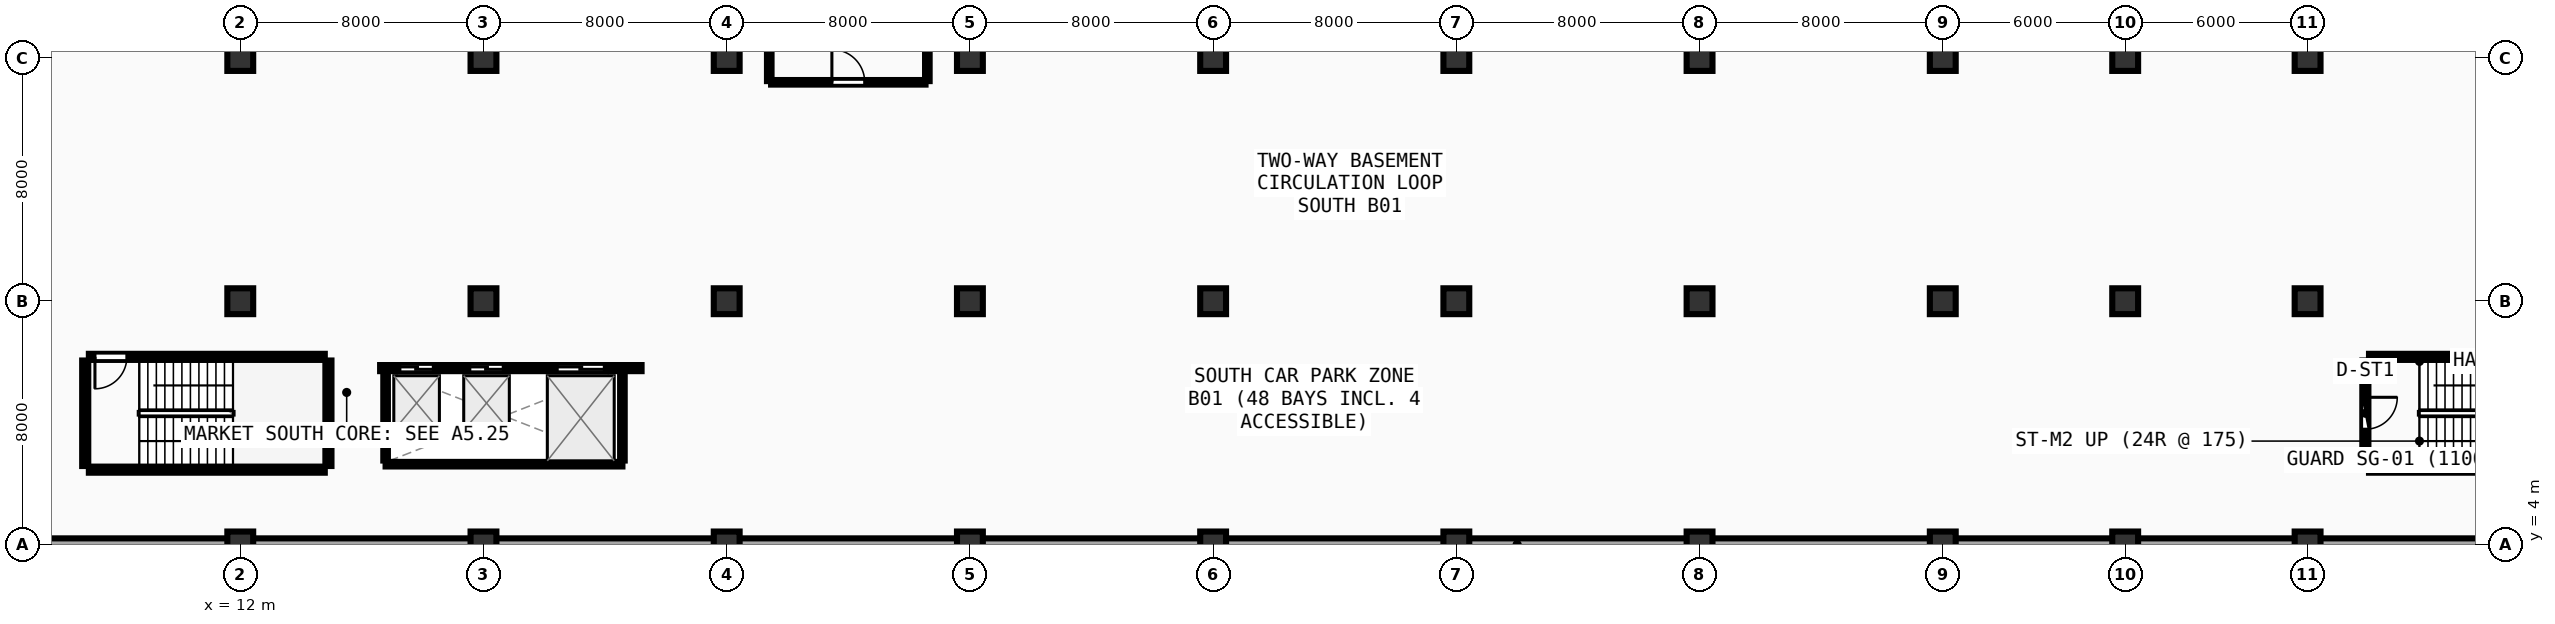
"""IFC4 building model, lengths in metres.
Left out: names, types, materials, properties, quantities, classifications, styles, units other than length and angle.
Written with IfcOpenShell. Run it as: python <this file> out.ifc"""

import sys

from ifc_helpers import new_model, si_unit, direction, frame, frame_2d, origin, origin_2d, place, context, subcontext, project, spatial, rectangle, extrude, element, fill, save


model = new_model("IFC4")
c1 = context("Model", 3, precision=1e-05, world=origin(), true_north=direction((0.0, 1.0)))
c2 = subcontext(c1, "Body", "Model", "MODEL_VIEW")
j1 = project(units=[si_unit("LENGTHUNIT", "METRE"), si_unit("PLANEANGLEUNIT", "RADIAN")], contexts=[c1])
p1 = place(None, origin())
s1 = spatial("IfcSite", under=j1, at=p1, CompositionType="ELEMENT")
p2 = place(p1, origin())
s2 = spatial("IfcBuilding", under=s1, at=p2, CompositionType="ELEMENT")
p3 = place(p2, frame((0.0, 0.0, -4.2)))
s3 = spatial("IfcBuildingStorey", under=s2, at=p3, CompositionType="ELEMENT", Elevation=-4.2)
for number, where, z_axis, x_axis in (
    (1, (12.0, 4.0, 0.0), (0.0, 0.0, 1.0), (1.0, 0.0, 0.0)),
    (2, (12.0, 12.0, 0.0), (0.0, 0.0, 1.0), (1.0, 0.0, 0.0)),
    (3, (12.0, 20.0, 0.0), (0.0, 0.0, 1.0), (1.0, 0.0, 0.0)),
    (4, (20.0, 4.0, 0.0), (0.0, 0.0, 1.0), (1.0, 0.0, 0.0)),
    (5, (20.0, 12.0, 0.0), (0.0, 0.0, 1.0), (1.0, 0.0, 0.0)),
    (6, (20.0, 20.0, 0.0), (0.0, 0.0, 1.0), (1.0, 0.0, 0.0)),
    (7, (28.0, 4.0, 0.0), (0.0, 0.0, 1.0), (1.0, 0.0, 0.0)),
    (8, (28.0, 12.0, 0.0), (0.0, 0.0, 1.0), (1.0, 0.0, 0.0)),
    (9, (28.0, 20.0, 0.0), (0.0, 0.0, 1.0), (1.0, 0.0, 0.0)),
    (10, (36.0, 4.0, 0.0), (0.0, 0.0, 1.0), (1.0, 0.0, 0.0)),
    (11, (36.0, 12.0, 0.0), (0.0, 0.0, 1.0), (1.0, 0.0, 0.0)),
    (12, (36.0, 20.0, 0.0), (0.0, 0.0, 1.0), (1.0, 0.0, 0.0)),
    (13, (44.0, 4.0, 0.0), (0.0, 0.0, 1.0), (1.0, 0.0, 0.0)),
    (14, (44.0, 12.0, 0.0), (0.0, 0.0, 1.0), (1.0, 0.0, 0.0)),
    (15, (44.0, 20.0, 0.0), (0.0, 0.0, 1.0), (1.0, 0.0, 0.0)),
    (16, (52.0, 4.0, 0.0), (0.0, 0.0, 1.0), (1.0, 0.0, 0.0)),
    (17, (52.0, 12.0, 0.0), (0.0, 0.0, 1.0), (1.0, 0.0, 0.0)),
    (18, (52.0, 20.0, 0.0), (0.0, 0.0, 1.0), (1.0, 0.0, 0.0)),
    (19, (60.0, 4.0, 0.0), (0.0, 0.0, 1.0), (1.0, 0.0, 0.0)),
    (20, (60.0, 12.0, 0.0), (0.0, 0.0, 1.0), (1.0, 0.0, 0.0)),
    (21, (60.0, 20.0, 0.0), (0.0, 0.0, 1.0), (1.0, 0.0, 0.0)),
    (22, (68.0, 4.0, 0.0), (0.0, 0.0, 1.0), (1.0, 0.0, 0.0)),
    (23, (68.0, 12.0, 0.0), (0.0, 0.0, 1.0), (1.0, 0.0, 0.0)),
    (24, (68.0, 20.0, 0.0), (0.0, 0.0, 1.0), (1.0, 0.0, 0.0)),
    (25, (74.0, 4.0, 0.0), (0.0, 0.0, 1.0), (1.0, 0.0, 0.0)),
    (26, (74.0, 12.0, 0.0), (0.0, 0.0, 1.0), (1.0, 0.0, 0.0)),
    (27, (74.0, 20.0, 0.0), (0.0, 0.0, 1.0), (1.0, 0.0, 0.0)),
    (28, (80.0, 4.0, 0.0), (0.0, 0.0, 1.0), (1.0, 0.0, 0.0)),
    (29, (80.0, 12.0, 0.0), (0.0, 0.0, 1.0), (1.0, 0.0, 0.0)),
    (30, (80.0, 20.0, 0.0), (0.0, 0.0, 1.0), (1.0, 0.0, 0.0)),
):
    element("IfcColumn", number, at=place(p3, frame(where, z_axis=z_axis, x_axis=x_axis)), inside=s3, PredefinedType="COLUMN", context=c2, shape_type="SweptSolid", body=[
        extrude(rectangle(XDim=0.85, YDim=0.85, at=origin_2d()), origin(), (0.0, 0.0, 1.0), 4.2),
    ])
p4 = place(p3, frame((4.55, 4.0, 0.0), z_axis=(0.0, 0.0, 1.0), x_axis=(1.0, 0.0, 0.0)))
e31 = element("IfcWall", 31, at=p4, inside=s3, PredefinedType="USERDEFINED", context=c2, shape_type="SweptSolid", body=[
    extrude(rectangle(XDim=98.9, YDim=0.4, at=frame_2d((49.45, 0.0))), origin(), (0.0, 0.0, 1.0), 3.9),
])
p5 = place(p3, frame((7.02, 6.46, 0.0), z_axis=(0.0, 0.0, 1.0), x_axis=(1.0, 0.0, 0.0)))
e32 = element("IfcWall", 32, at=p5, inside=s3, PredefinedType="SHEAR", context=c2, shape_type="SweptSolid", body=[
    extrude(rectangle(XDim=7.76, YDim=0.2, at=frame_2d((3.88, 0.0))), origin(), (0.0, 0.0, 1.0), 3.88),
])
p6 = place(p3, frame((14.9, 6.58, 0.0), z_axis=(0.0, 0.0, 1.0), x_axis=(0.0, 1.0, 0.0)))
e33 = element("IfcWall", 33, at=p6, inside=s3, PredefinedType="SHEAR", context=c2, shape_type="SweptSolid", body=[
    extrude(rectangle(XDim=3.47, YDim=0.2, at=frame_2d((1.735, 0.0))), origin(), (0.0, 0.0, 1.0), 3.88),
])
p7 = place(p3, frame((14.78, 10.17, 0.0), z_axis=(0.0, 0.0, 1.0), x_axis=(-1.0, 0.0, 0.0)))
e34 = element("IfcWall", 34, at=p7, inside=s3, PredefinedType="SHEAR", context=c2, shape_type="SweptSolid", body=[
    extrude(rectangle(XDim=7.76, YDim=0.2, at=frame_2d((3.88, 0.0))), origin(), (0.0, 0.0, 1.0), 3.88),
])
p8 = place(p7, frame((6.51, 0.0, 0.0)))
e35 = element("IfcOpeningElement", 35, at=p8, cuts=e34, PredefinedType="OPENING", context=c2, shape_type="SweptSolid", body=[
    extrude(rectangle(XDim=1.05, YDim=2.1, at=frame_2d((0.525, 1.05))), frame((0.0, 0.11, 0.0), z_axis=(0.0, -1.0, 0.0), x_axis=(1.0, 0.0, 0.0)), (0.0, 0.0, 1.0), 0.22),
])
p9 = place(p3, frame((6.9, 10.05, 0.0), z_axis=(0.0, 0.0, 1.0), x_axis=(0.0, -1.0, 0.0)))
e36 = element("IfcWall", 36, at=p9, inside=s3, PredefinedType="SHEAR", context=c2, shape_type="SweptSolid", body=[
    extrude(rectangle(XDim=3.47, YDim=0.2, at=frame_2d((1.735, 0.0))), origin(), (0.0, 0.0, 1.0), 3.88),
])
for number, where, z_axis, x_axis in (
    (37, (82.02, 6.46, 0.0), (0.0, 0.0, 1.0), (1.0, 0.0, 0.0)),
    (38, (89.78, 10.17, 0.0), (0.0, 0.0, 1.0), (-1.0, 0.0, 0.0)),
):
    element("IfcWall", number, at=place(p3, frame(where, z_axis=z_axis, x_axis=x_axis)), inside=s3, PredefinedType="SHEAR", context=c2, shape_type="SweptSolid", body=[
        extrude(rectangle(XDim=7.76, YDim=0.2, at=frame_2d((3.88, 0.0))), origin(), (0.0, 0.0, 1.0), 3.88),
    ])
p10 = place(p3, frame((81.9, 10.05, 0.0), z_axis=(0.0, 0.0, 1.0), x_axis=(0.0, -1.0, 0.0)))
e39 = element("IfcWall", 39, at=p10, inside=s3, PredefinedType="SHEAR", context=c2, shape_type="SweptSolid", body=[
    extrude(rectangle(XDim=3.47, YDim=0.2, at=frame_2d((1.735, 0.0))), origin(), (0.0, 0.0, 1.0), 3.88),
])
p11 = place(p10, frame((1.21, 0.0, 0.0)))
e40 = element("IfcOpeningElement", 40, at=p11, cuts=e39, PredefinedType="OPENING", context=c2, shape_type="SweptSolid", body=[
    extrude(rectangle(XDim=1.05, YDim=2.1, at=frame_2d((0.525, 1.05))), frame((0.0, 0.11, 0.0), z_axis=(0.0, -1.0, 0.0), x_axis=(1.0, 0.0, 0.0)), (0.0, 0.0, 1.0), 0.22),
])
p12 = place(p3, frame((16.6, 9.8, 0.0), z_axis=(0.0, 0.0, 1.0), x_axis=(1.0, 0.0, 0.0)))
e41 = element("IfcWall", 41, at=p12, inside=s3, PredefinedType="SOLIDWALL", context=c2, shape_type="SweptSolid", body=[
    extrude(rectangle(XDim=8.6, YDim=0.2, at=frame_2d((4.3, 0.0))), origin(), (0.0, 0.0, 1.0), 2.685),
])
p13 = place(p12, frame((0.65, 0.0, 0.0)))
e42 = element("IfcOpeningElement", 42, at=p13, cuts=e41, PredefinedType="OPENING", context=c2, shape_type="SweptSolid", body=[
    extrude(rectangle(XDim=1.1, YDim=2.1, at=frame_2d((0.55, 1.05))), frame((0.0, 0.11, 0.0), z_axis=(0.0, -1.0, 0.0), x_axis=(1.0, 0.0, 0.0)), (0.0, 0.0, 1.0), 0.22),
])
p14 = place(p12, frame((2.95, 0.0, 0.0)))
e43 = element("IfcOpeningElement", 43, at=p14, cuts=e41, PredefinedType="OPENING", context=c2, shape_type="SweptSolid", body=[
    extrude(rectangle(XDim=1.1, YDim=2.1, at=frame_2d((0.55, 1.05))), frame((0.0, 0.11, 0.0), z_axis=(0.0, -1.0, 0.0), x_axis=(1.0, 0.0, 0.0)), (0.0, 0.0, 1.0), 0.22),
])
p15 = place(p12, frame((5.825, 0.0, 0.0)))
e44 = element("IfcOpeningElement", 44, at=p15, cuts=e41, PredefinedType="OPENING", context=c2, shape_type="SweptSolid", body=[
    extrude(rectangle(XDim=1.55, YDim=2.2, at=frame_2d((0.775, 1.1))), frame((0.0, 0.11, 0.0), z_axis=(0.0, -1.0, 0.0), x_axis=(1.0, 0.0, 0.0)), (0.0, 0.0, 1.0), 0.22),
])
p16 = place(p3, frame((16.78, 6.64, 0.0), z_axis=(0.0, 0.0, 1.0), x_axis=(1.0, 0.0, 0.0)))
e45 = element("IfcWall", 45, at=p16, inside=s3, PredefinedType="PARTITIONING", context=c2, shape_type="SweptSolid", body=[
    extrude(rectangle(XDim=7.79, YDim=0.15, at=frame_2d((3.895, 0.0))), origin(), (0.0, 0.0, 1.0), 2.685),
])
for number, where, z_axis, x_axis in (
    (46, (16.78, 6.76, 0.0), (0.0, 0.0, 1.0), (0.0, 1.0, 0.0)),
    (47, (24.57, 6.76, 0.0), (0.0, 0.0, 1.0), (0.0, 1.0, 0.0)),
):
    element("IfcWall", number, at=place(p3, frame(where, z_axis=z_axis, x_axis=x_axis)), inside=s3, PredefinedType="PARTITIONING", context=c2, shape_type="SweptSolid", body=[
        extrude(rectangle(XDim=2.91, YDim=0.15, at=frame_2d((1.455, 0.0))), origin(), (0.0, 0.0, 1.0), 3.87),
    ])
p17 = place(p3, frame((29.46, 19.2, 0.0), z_axis=(0.0, 0.0, 1.0), x_axis=(1.0, 0.0, 0.0)))
e48 = element("IfcWall", 48, at=p17, inside=s3, PredefinedType="PARTITIONING", context=c2, shape_type="SweptSolid", body=[
    extrude(rectangle(XDim=5.08, YDim=0.15, at=frame_2d((2.54, 0.0))), origin(), (0.0, 0.0, 1.0), 3.89),
])
p18 = place(p17, frame((2.0, 0.0, 0.0)))
e49 = element("IfcOpeningElement", 49, at=p18, cuts=e48, PredefinedType="OPENING", context=c2, shape_type="SweptSolid", body=[
    extrude(rectangle(XDim=1.08, YDim=2.1, at=frame_2d((0.54, 1.05))), frame((0.0, 0.085, 0.0), z_axis=(0.0, -1.0, 0.0), x_axis=(1.0, 0.0, 0.0)), (0.0, 0.0, 1.0), 0.17),
])
for number, where, z_axis, x_axis in (
    (50, (34.6, 19.24, 0.0), (0.0, 0.0, 1.0), (0.0, 1.0, 0.0)),
    (51, (29.4, 25.36, 0.0), (0.0, 0.0, 1.0), (0.0, -1.0, 0.0)),
):
    element("IfcWall", number, at=place(p3, frame(where, z_axis=z_axis, x_axis=x_axis)), inside=s3, PredefinedType="PARTITIONING", context=c2, shape_type="SweptSolid", body=[
        extrude(rectangle(XDim=6.12, YDim=0.15, at=frame_2d((3.06, 0.0))), origin(), (0.0, 0.0, 1.0), 2.685),
    ])
p19 = place(p8, origin())
e52 = element("IfcDoor", 52, at=p19, inside=s3, OperationType="SINGLE_SWING_RIGHT", PredefinedType="DOOR", context=c2, shape_type="SweptSolid", body=[
    extrude(rectangle(XDim=1.05, YDim=2.1, at=frame_2d((0.525, 1.05))), frame((0.0, 0.025, 0.0), z_axis=(0.0, -1.0, 0.0), x_axis=(1.0, 0.0, 0.0)), (0.0, 0.0, 1.0), 0.05),
])
fill(e35, e52)
p20 = place(p11, origin())
e53 = element("IfcDoor", 53, at=p20, inside=s3, OperationType="SINGLE_SWING_LEFT", PredefinedType="DOOR", context=c2, shape_type="SweptSolid", body=[
    extrude(rectangle(XDim=1.05, YDim=2.1, at=frame_2d((0.525, 1.05))), frame((0.0, 0.025, 0.0), z_axis=(0.0, -1.0, 0.0), x_axis=(1.0, 0.0, 0.0)), (0.0, 0.0, 1.0), 0.05),
])
fill(e40, e53)
p21 = place(p13, origin())
e54 = element("IfcDoor", 54, at=p21, inside=s3, OperationType="DOUBLE_DOOR_SLIDING", PredefinedType="DOOR", context=c2, shape_type="SweptSolid", body=[
    extrude(rectangle(XDim=1.1, YDim=2.1, at=frame_2d((0.55, 1.05))), frame((0.0, 0.025, 0.0), z_axis=(0.0, -1.0, 0.0), x_axis=(1.0, 0.0, 0.0)), (0.0, 0.0, 1.0), 0.05),
])
fill(e42, e54)
p22 = place(p14, origin())
e55 = element("IfcDoor", 55, at=p22, inside=s3, OperationType="DOUBLE_DOOR_SLIDING", PredefinedType="DOOR", context=c2, shape_type="SweptSolid", body=[
    extrude(rectangle(XDim=1.1, YDim=2.1, at=frame_2d((0.55, 1.05))), frame((0.0, 0.025, 0.0), z_axis=(0.0, -1.0, 0.0), x_axis=(1.0, 0.0, 0.0)), (0.0, 0.0, 1.0), 0.05),
])
fill(e43, e55)
p23 = place(p15, origin())
e56 = element("IfcDoor", 56, at=p23, inside=s3, OperationType="DOUBLE_DOOR_SLIDING", PredefinedType="DOOR", context=c2, shape_type="SweptSolid", body=[
    extrude(rectangle(XDim=1.55, YDim=2.2, at=frame_2d((0.775, 1.1))), frame((0.0, 0.025, 0.0), z_axis=(0.0, -1.0, 0.0), x_axis=(1.0, 0.0, 0.0)), (0.0, 0.0, 1.0), 0.05),
])
fill(e44, e56)
p24 = place(p18, origin())
e57 = element("IfcDoor", 57, at=p24, inside=s3, OperationType="SINGLE_SWING_LEFT", PredefinedType="DOOR", context=c2, shape_type="SweptSolid", body=[
    extrude(rectangle(XDim=1.08, YDim=2.1, at=frame_2d((0.54, 1.05))), frame((0.0, 0.025, 0.0), z_axis=(0.0, -1.0, 0.0), x_axis=(1.0, 0.0, 0.0)), (0.0, 0.0, 1.0), 0.05),
])
fill(e49, e57)
save(model, sys.argv[1])
